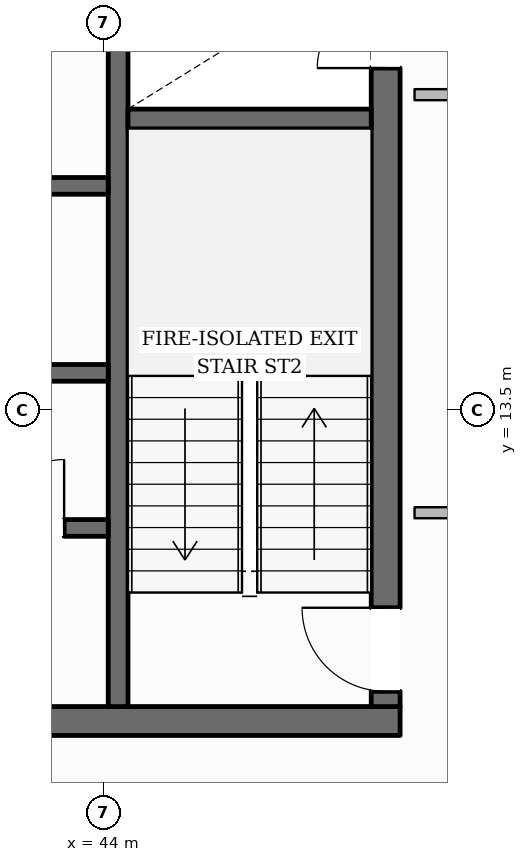
"""IFC4 building model, lengths in metres.
Left out: names, types, materials, properties, quantities, classifications, styles, units other than length and angle.
Written with IfcOpenShell. Run it as: python <this file> out.ifc"""

import sys

from ifc_helpers import new_model, si_unit, direction, frame, frame_2d, origin, place, context, subcontext, project, spatial, rectangle, extrude, element, fill, save


model = new_model("IFC4")
c1 = context("Model", 3, precision=1e-05, world=origin(), true_north=direction((0.0, 1.0)))
c2 = subcontext(c1, "Body", "Model", "MODEL_VIEW")
j1 = project(units=[si_unit("LENGTHUNIT", "METRE"), si_unit("PLANEANGLEUNIT", "RADIAN")], contexts=[c1])
p1 = place(None, origin())
s1 = spatial("IfcSite", under=j1, at=p1, CompositionType="ELEMENT")
p2 = place(p1, origin())
s2 = spatial("IfcBuilding", under=s1, at=p2, CompositionType="ELEMENT")
p3 = place(p2, frame((0.0, 0.0, 278.0)))
s3 = spatial("IfcBuildingStorey", under=s2, at=p3, CompositionType="ELEMENT", Elevation=278.0)
p4 = place(p3, frame((28.1, 9.41, 0.0), z_axis=(0.0, 0.0, 1.0), x_axis=(1.0, 0.0, 0.0)))
e1 = element("IfcWall", 1, at=p4, inside=s3, PredefinedType="SOLIDWALL", context=c2, shape_type="SweptSolid", body=[
    extrude(rectangle(XDim=19.8, YDim=0.38, at=frame_2d((9.9, 0.0))), origin(), (0.0, 0.0, 1.0), 3.61),
])
p5 = place(p4, frame((10.4, 0.0, 0.0)))
e2 = element("IfcOpeningElement", 2, at=p5, cuts=e1, PredefinedType="OPENING", context=c2, shape_type="SweptSolid", body=[
    extrude(rectangle(XDim=1.4, YDim=2.2, at=frame_2d((0.7, 1.1))), frame((0.0, 0.2, 0.0), z_axis=(0.0, -1.0, 0.0), x_axis=(1.0, 0.0, 0.0)), (0.0, 0.0, 1.0), 0.4),
])
p6 = place(p3, frame((47.71, 9.6, 0.0), z_axis=(0.0, 0.0, 1.0), x_axis=(0.0, 1.0, 0.0)))
e3 = element("IfcWall", 3, at=p6, inside=s3, PredefinedType="SOLIDWALL", context=c2, shape_type="SweptSolid", body=[
    extrude(rectangle(XDim=13.0, YDim=0.38, at=frame_2d((6.5, 0.0))), origin(), (0.0, 0.0, 1.0), 3.61),
])
p7 = place(p6, frame((0.2, 0.0, 0.0)))
e4 = element("IfcOpeningElement", 4, at=p7, cuts=e3, PredefinedType="OPENING", context=c2, shape_type="SweptSolid", body=[
    extrude(rectangle(XDim=1.1, YDim=2.15, at=frame_2d((0.55, 1.075))), frame((0.0, 0.2, 0.0), z_axis=(0.0, -1.0, 0.0), x_axis=(1.0, 0.0, 0.0)), (0.0, 0.0, 1.0), 0.4),
])
p8 = place(p6, frame((8.4, 0.0, 0.0)))
e5 = element("IfcOpeningElement", 5, at=p8, cuts=e3, PredefinedType="OPENING", context=c2, shape_type="SweptSolid", body=[
    extrude(rectangle(XDim=0.9, YDim=2.1, at=frame_2d((0.45, 1.05))), frame((0.0, 0.2, 0.0), z_axis=(0.0, -1.0, 0.0), x_axis=(1.0, 0.0, 0.0)), (0.0, 0.0, 1.0), 0.4),
])
p9 = place(p3, frame((44.19, 9.6, 0.0), z_axis=(0.0, 0.0, 1.0), x_axis=(0.0, 1.0, 0.0)))
e6 = element("IfcWall", 6, at=p9, inside=s3, PredefinedType="SHEAR", context=c2, shape_type="SweptSolid", body=[
    extrude(rectangle(XDim=13.0, YDim=0.26, at=frame_2d((6.5, 0.0))), origin(), (0.0, 0.0, 1.0), 3.61),
])
p10 = place(p9, frame((10.925, 0.0, 0.0)))
e7 = element("IfcOpeningElement", 7, at=p10, cuts=e6, PredefinedType="OPENING", context=c2, shape_type="SweptSolid", body=[
    extrude(rectangle(XDim=1.25, YDim=2.25, at=frame_2d((0.625, 1.125))), frame((0.0, 0.14, 0.0), z_axis=(0.0, -1.0, 0.0), x_axis=(1.0, 0.0, 0.0)), (0.0, 0.0, 1.0), 0.28),
])
p11 = place(p3, frame((44.32, 17.33, 0.0), z_axis=(0.0, 0.0, 1.0), x_axis=(1.0, 0.0, 0.0)))
e8 = element("IfcWall", 8, at=p11, inside=s3, PredefinedType="SHEAR", context=c2, shape_type="SweptSolid", body=[
    extrude(rectangle(XDim=3.2, YDim=0.26, at=frame_2d((1.6, 0.0))), origin(), (0.0, 0.0, 1.0), 3.61),
])
p12 = place(p3, frame((31.94, 16.45, 0.0), z_axis=(0.0, 0.0, 1.0), x_axis=(1.0, 0.0, 0.0)))
e9 = element("IfcWall", 9, at=p12, inside=s3, PredefinedType="SOLIDWALL", context=c2, shape_type="SweptSolid", body=[
    extrude(rectangle(XDim=12.12, YDim=0.22, at=frame_2d((6.06, 0.0))), origin(), (0.0, 0.0, 1.0), 3.61),
])
p13 = place(p3, frame((31.94, 13.99, 0.0), z_axis=(0.0, 0.0, 1.0), x_axis=(1.0, 0.0, 0.0)))
e10 = element("IfcWall", 10, at=p13, inside=s3, PredefinedType="SOLIDWALL", context=c2, shape_type="SweptSolid", body=[
    extrude(rectangle(XDim=12.12, YDim=0.22, at=frame_2d((6.06, 0.0))), origin(), (0.0, 0.0, 1.0), 3.61),
])
p14 = place(p13, frame((1.11, 0.0, 0.0)))
e11 = element("IfcOpeningElement", 11, at=p14, cuts=e10, PredefinedType="OPENING", context=c2, shape_type="SweptSolid", body=[
    extrude(rectangle(XDim=0.9, YDim=2.1, at=frame_2d((0.45, 1.05))), frame((0.0, 0.12, 0.0), z_axis=(0.0, -1.0, 0.0), x_axis=(1.0, 0.0, 0.0)), (0.0, 0.0, 1.0), 0.24),
])
p15 = place(p13, frame((5.16, 0.0, 0.0)))
e12 = element("IfcOpeningElement", 12, at=p15, cuts=e10, PredefinedType="OPENING", context=c2, shape_type="SweptSolid", body=[
    extrude(rectangle(XDim=0.9, YDim=2.1, at=frame_2d((0.45, 1.05))), frame((0.0, 0.12, 0.0), z_axis=(0.0, -1.0, 0.0), x_axis=(1.0, 0.0, 0.0)), (0.0, 0.0, 1.0), 0.24),
])
p16 = place(p13, frame((9.61, 0.0, 0.0)))
e13 = element("IfcOpeningElement", 13, at=p16, cuts=e10, PredefinedType="OPENING", context=c2, shape_type="SweptSolid", body=[
    extrude(rectangle(XDim=0.9, YDim=2.1, at=frame_2d((0.45, 1.05))), frame((0.0, 0.12, 0.0), z_axis=(0.0, -1.0, 0.0), x_axis=(1.0, 0.0, 0.0)), (0.0, 0.0, 1.0), 0.24),
])
p17 = place(p3, frame((40.28, 11.95, 0.0), z_axis=(0.0, 0.0, 1.0), x_axis=(1.0, 0.0, 0.0)))
e14 = element("IfcWall", 14, at=p17, inside=s3, PredefinedType="SOLIDWALL", context=c2, shape_type="SweptSolid", body=[
    extrude(rectangle(XDim=3.78, YDim=0.22, at=frame_2d((1.89, 0.0))), origin(), (0.0, 0.0, 1.0), 3.61),
])
p18 = place(p17, frame((0.47, 0.0, 0.0)))
e15 = element("IfcOpeningElement", 15, at=p18, cuts=e14, PredefinedType="OPENING", context=c2, shape_type="SweptSolid", body=[
    extrude(rectangle(XDim=0.9, YDim=2.1, at=frame_2d((0.45, 1.05))), frame((0.0, 0.12, 0.0), z_axis=(0.0, -1.0, 0.0), x_axis=(1.0, 0.0, 0.0)), (0.0, 0.0, 1.0), 0.24),
])
p19 = place(p17, frame((2.3, 0.0, 0.0)))
e16 = element("IfcOpeningElement", 16, at=p19, cuts=e14, PredefinedType="OPENING", context=c2, shape_type="SweptSolid", body=[
    extrude(rectangle(XDim=0.9, YDim=2.1, at=frame_2d((0.45, 1.05))), frame((0.0, 0.12, 0.0), z_axis=(0.0, -1.0, 0.0), x_axis=(1.0, 0.0, 0.0)), (0.0, 0.0, 1.0), 0.24),
])
p20 = place(p3, frame((40.917, 43.461, 0.0), z_axis=(0.0, 0.0, 1.0), x_axis=(0.506204788728, -0.862413306872, 0.0)))
e17 = element("IfcWall", 17, at=p20, inside=s3, PredefinedType="STANDARD", context=c2, shape_type="SweptSolid", body=[
    extrude(rectangle(XDim=38.352, YDim=0.35, at=frame_2d((19.176, 0.0))), origin(), (0.0, 0.0, 1.0), 3.196),
])
p21 = place(p20, frame((9.188, 0.0, 0.0)))
e18 = element("IfcOpeningElement", 18, at=p21, cuts=e17, PredefinedType="OPENING", context=c2, shape_type="SweptSolid", body=[
    extrude(rectangle(XDim=1.0, YDim=2.2, at=frame_2d((0.5, 1.1))), frame((0.0, 0.185, 0.0), z_axis=(0.0, -1.0, 0.0), x_axis=(1.0, 0.0, 0.0)), (0.0, 0.0, 1.0), 0.37),
])
p22 = place(p20, frame((34.078, 0.0, 0.65)))
e19 = element("IfcOpeningElement", 19, at=p22, cuts=e17, PredefinedType="OPENING", context=c2, shape_type="SweptSolid", body=[
    extrude(rectangle(XDim=1.35, YDim=1.75, at=frame_2d((0.675, 0.875))), frame((0.0, 0.185, 0.0), z_axis=(0.0, -1.0, 0.0), x_axis=(1.0, 0.0, 0.0)), (0.0, 0.0, 1.0), 0.37),
])
p23 = place(p20, frame((27.846, 0.0, 0.65)))
e20 = element("IfcOpeningElement", 20, at=p23, cuts=e17, PredefinedType="OPENING", context=c2, shape_type="SweptSolid", body=[
    extrude(rectangle(XDim=1.35, YDim=1.75, at=frame_2d((0.675, 0.875))), frame((0.0, 0.185, 0.0), z_axis=(0.0, -1.0, 0.0), x_axis=(1.0, 0.0, 0.0)), (0.0, 0.0, 1.0), 0.37),
])
p24 = place(p20, frame((21.614, 0.0, 0.65)))
e21 = element("IfcOpeningElement", 21, at=p24, cuts=e17, PredefinedType="OPENING", context=c2, shape_type="SweptSolid", body=[
    extrude(rectangle(XDim=1.35, YDim=1.75, at=frame_2d((0.675, 0.875))), frame((0.0, 0.185, 0.0), z_axis=(0.0, -1.0, 0.0), x_axis=(1.0, 0.0, 0.0)), (0.0, 0.0, 1.0), 0.37),
])
p25 = place(p20, frame((2.917, 0.0, 0.65)))
e22 = element("IfcOpeningElement", 22, at=p25, cuts=e17, PredefinedType="OPENING", context=c2, shape_type="SweptSolid", body=[
    extrude(rectangle(XDim=1.35, YDim=1.75, at=frame_2d((0.675, 0.875))), frame((0.0, 0.185, 0.0), z_axis=(0.0, -1.0, 0.0), x_axis=(1.0, 0.0, 0.0)), (0.0, 0.0, 1.0), 0.37),
])
for number, where, z_axis, x_axis in (
    (23, (49.91, 17.65, 0.0), (0.0, 0.0, 1.0), (-1.0, 0.0, 0.0)),
    (24, (48.09, 12.15, 0.0), (0.0, 0.0, 1.0), (1.0, 0.0, 0.0)),
):
    element("IfcWall", number, at=place(p3, frame(where, z_axis=z_axis, x_axis=x_axis)), inside=s3, PredefinedType="PARTITIONING", context=c2, shape_type="SweptSolid", body=[
        extrude(rectangle(XDim=1.82, YDim=0.145, at=frame_2d((0.91, 0.0))), origin(), (0.0, 0.0, 1.0), 3.61),
    ])
p26 = place(p7, origin())
e25 = element("IfcDoor", 25, at=p26, inside=s3, OperationType="SINGLE_SWING_RIGHT", PredefinedType="DOOR", context=c2, shape_type="SweptSolid", body=[
    extrude(rectangle(XDim=1.1, YDim=2.15, at=frame_2d((0.55, 1.075))), frame((0.0, 0.025, 0.0), z_axis=(0.0, -1.0, 0.0), x_axis=(1.0, 0.0, 0.0)), (0.0, 0.0, 1.0), 0.05),
])
fill(e4, e25)
p27 = place(p8, origin())
e26 = element("IfcDoor", 26, at=p27, inside=s3, OperationType="SINGLE_SWING_LEFT", PredefinedType="DOOR", context=c2, shape_type="SweptSolid", body=[
    extrude(rectangle(XDim=0.9, YDim=2.1, at=frame_2d((0.45, 1.05))), frame((0.0, 0.025, 0.0), z_axis=(0.0, -1.0, 0.0), x_axis=(1.0, 0.0, 0.0)), (0.0, 0.0, 1.0), 0.05),
])
fill(e5, e26)
p28 = place(p19, origin())
e27 = element("IfcDoor", 27, at=p28, inside=s3, OperationType="SINGLE_SWING_RIGHT", PredefinedType="DOOR", context=c2, shape_type="SweptSolid", body=[
    extrude(rectangle(XDim=0.9, YDim=2.1, at=frame_2d((0.45, 1.05))), frame((0.0, 0.025, 0.0), z_axis=(0.0, -1.0, 0.0), x_axis=(1.0, 0.0, 0.0)), (0.0, 0.0, 1.0), 0.05),
])
fill(e16, e27)
save(model, sys.argv[1])
